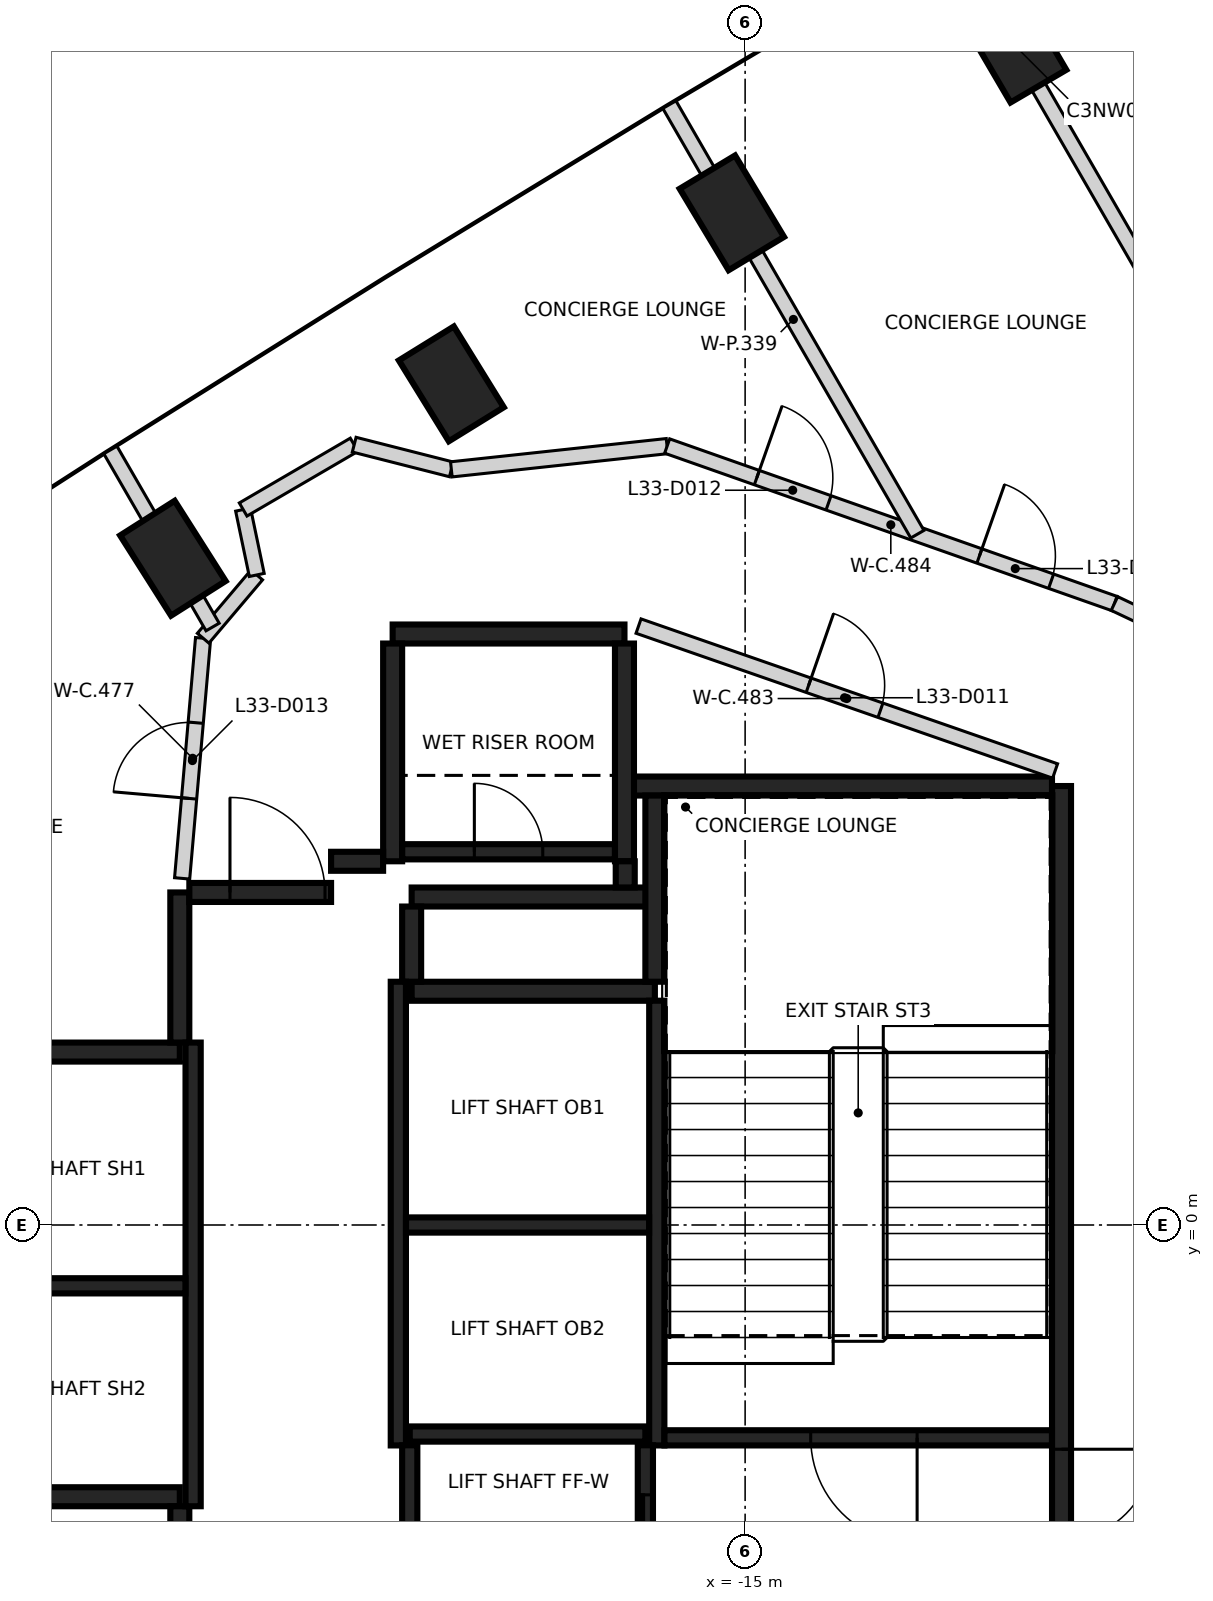
"""IFC4 building model, lengths in metres.
Left out: names, types, materials, properties, quantities, classifications, styles, units other than length and angle.
Written with IfcOpenShell. Run it as: python <this file> out.ifc"""

import sys

from ifc_helpers import new_model, si_unit, direction, frame, frame_2d, origin, origin_2d, place, context, subcontext, project, spatial, rectangle, extrude, element, fill, save


model = new_model("IFC4")
c1 = context("Model", 3, precision=1e-05, world=origin(), true_north=direction((0.0, 1.0)))
c2 = subcontext(c1, "Body", "Model", "MODEL_VIEW")
j1 = project(units=[si_unit("LENGTHUNIT", "METRE"), si_unit("PLANEANGLEUNIT", "RADIAN")], contexts=[c1])
p1 = place(None, origin())
s1 = spatial("IfcSite", under=j1, at=p1, CompositionType="ELEMENT")
p2 = place(p1, origin())
s2 = spatial("IfcBuilding", under=s1, at=p2, CompositionType="ELEMENT")
p3 = place(p2, frame((0.0, 0.0, 136.0)))
s3 = spatial("IfcBuildingStorey", under=s2, at=p3, CompositionType="ELEMENT", Elevation=136.0)
for number, where, z_axis, x_axis in (
    (1, (-11.457, 15.522, -0.4), (0.0, 0.0, 1.0), (-0.505, 0.863, 0.0)),
    (2, (-15.175, 13.316, -0.4), (0.0, 0.0, 1.0), (-0.515, 0.857, 0.0)),
    (3, (-18.865, 11.066, -0.4), (0.0, 0.0, 1.0), (-0.526, 0.851, 0.0)),
    (4, (-22.529, 8.772, -0.4), (0.0, 0.0, 1.0), (-0.536, 0.844, 0.0)),
):
    element("IfcColumn", number, at=place(p3, frame(where, z_axis=z_axis, x_axis=x_axis)), inside=s3, PredefinedType="COLUMN", context=c2, shape_type="SweptSolid", body=[
        extrude(rectangle(XDim=1.25, YDim=0.85, at=origin_2d()), origin(), (0.0, 0.0, 1.0), 3.6),
    ])
p4 = place(p3, frame((-10.837, 5.775, 0.0), z_axis=(0.0, 0.0, 1.0), x_axis=(0.0, -1.0, 0.0)))
e5 = element("IfcWall", 5, at=p4, inside=s3, PredefinedType="SHEAR", context=c2, shape_type="SweptSolid", body=[
    extrude(rectangle(XDim=11.55, YDim=0.25, at=frame_2d((5.775, 0.0))), origin(), (0.0, 0.0, 1.0), 3.2),
])
p5 = place(p4, frame((10.025, 0.0, 0.0)))
e6 = element("IfcOpeningElement", 6, at=p5, cuts=e5, PredefinedType="OPENING", context=c2, shape_type="SweptSolid", body=[
    extrude(rectangle(XDim=1.2, YDim=2.1, at=frame_2d((0.6, 1.05))), frame((0.0, 0.135, 0.0), z_axis=(0.0, -1.0, 0.0), x_axis=(1.0, 0.0, 0.0)), (0.0, 0.0, 1.0), 0.27),
])
p6 = place(p4, frame((8.725, 0.0, 0.0)))
e7 = element("IfcOpeningElement", 7, at=p6, cuts=e5, PredefinedType="OPENING", context=c2, shape_type="SweptSolid", body=[
    extrude(rectangle(XDim=1.2, YDim=2.1, at=frame_2d((0.6, 1.05))), frame((0.0, 0.135, 0.0), z_axis=(0.0, -1.0, 0.0), x_axis=(1.0, 0.0, 0.0)), (0.0, 0.0, 1.0), 0.27),
])
p7 = place(p3, frame((-16.472, 5.775, 0.0), z_axis=(0.0, 0.0, 1.0), x_axis=(1.0, 0.0, 0.0)))
e8 = element("IfcWall", 8, at=p7, inside=s3, PredefinedType="SHEAR", context=c2, shape_type="SweptSolid", body=[
    extrude(rectangle(XDim=5.51, YDim=0.25, at=frame_2d((2.755, 0.0))), origin(), (0.0, 0.0, 1.0), 3.2),
])
p8 = place(p3, frame((-19.387, 3.075, 0.0), z_axis=(0.0, 0.0, 1.0), x_axis=(1.0, 0.0, 0.0)))
e9 = element("IfcWall", 9, at=p8, inside=s3, PredefinedType="SHEAR", context=c2, shape_type="SweptSolid", body=[
    extrude(rectangle(XDim=3.2, YDim=0.25, at=frame_2d((1.6, 0.0))), origin(), (0.0, 0.0, 1.0), 3.2),
])
for number, where, z_axis, x_axis in (
    (10, (-22.437, -3.575, 0.0), (0.0, 0.0, 1.0), (-1.0, 0.0, 0.0)),
    (11, (-25.412, 2.275, 0.0), (0.0, 0.0, 1.0), (1.0, 0.0, 0.0)),
):
    element("IfcWall", number, at=place(p3, frame(where, z_axis=z_axis, x_axis=x_axis)), inside=s3, PredefinedType="SHEAR", context=c2, shape_type="SweptSolid", body=[
        extrude(rectangle(XDim=2.975, YDim=0.25, at=frame_2d((1.487, 0.0))), origin(), (0.0, 0.0, 1.0), 3.2),
    ])
p9 = place(p3, frame((-19.637, 7.775, 0.0), z_axis=(0.0, 0.0, 1.0), x_axis=(1.0, 0.0, 0.0)))
e12 = element("IfcWall", 12, at=p9, inside=s3, PredefinedType="SHEAR", context=c2, shape_type="SweptSolid", body=[
    extrude(rectangle(XDim=3.05, YDim=0.25, at=frame_2d((1.525, 0.0))), origin(), (0.0, 0.0, 1.0), 3.2),
])
for number, where, z_axis, x_axis in (
    (13, (-16.587, 7.65, 0.0), (0.0, 0.0, 1.0), (0.0, -1.0, 0.0)),
    (14, (-19.637, 4.785, 0.0), (0.0, 0.0, 1.0), (0.0, 1.0, 0.0)),
):
    element("IfcWall", number, at=place(p3, frame(where, z_axis=z_axis, x_axis=x_axis)), inside=s3, PredefinedType="SHEAR", context=c2, shape_type="SweptSolid", body=[
        extrude(rectangle(XDim=2.865, YDim=0.25, at=frame_2d((1.432, 0.0))), origin(), (0.0, 0.0, 1.0), 3.2),
    ])
p10 = place(p3, frame((-16.302, 4.315, 0.0), z_axis=(0.0, 0.0, 1.0), x_axis=(-1.0, 0.0, 0.0)))
e15 = element("IfcWall", 15, at=p10, inside=s3, PredefinedType="SHEAR", context=c2, shape_type="SweptSolid", body=[
    extrude(rectangle(XDim=3.085, YDim=0.25, at=frame_2d((1.542, 0.0))), origin(), (0.0, 0.0, 1.0), 3.2),
])
p11 = place(p3, frame((-16.187, 3.2, 0.0), z_axis=(0.0, 0.0, 1.0), x_axis=(0.0, 1.0, 0.0)))
e16 = element("IfcWall", 16, at=p11, inside=s3, PredefinedType="SHEAR", context=c2, shape_type="SweptSolid", body=[
    extrude(rectangle(XDim=2.449, YDim=0.25, at=frame_2d((1.225, 0.0))), origin(), (0.0, 0.0, 1.0), 3.2),
])
p12 = place(p3, frame((-22.437, 2.4, 0.0), z_axis=(0.0, 0.0, 1.0), x_axis=(0.0, 1.0, 0.0)))
e17 = element("IfcWall", 17, at=p12, inside=s3, PredefinedType="SHEAR", context=c2, shape_type="SweptSolid", body=[
    extrude(rectangle(XDim=1.975, YDim=0.25, at=frame_2d((0.987, 0.0))), origin(), (0.0, 0.0, 1.0), 3.2),
])
p13 = place(p3, frame((-22.437, -5.55, 0.0), z_axis=(0.0, 0.0, 1.0), x_axis=(0.0, 1.0, 0.0)))
e18 = element("IfcWall", 18, at=p13, inside=s3, PredefinedType="SHEAR", context=c2, shape_type="SweptSolid", body=[
    extrude(rectangle(XDim=1.849, YDim=0.25, at=frame_2d((0.925, 0.0))), origin(), (0.0, 0.0, 1.0), 3.2),
])
p14 = place(p3, frame((-22.312, 4.375, 0.0), z_axis=(0.0, 0.0, 1.0), x_axis=(1.0, 0.0, 0.0)))
e19 = element("IfcWall", 19, at=p14, inside=s3, PredefinedType="SHEAR", context=c2, shape_type="SweptSolid", body=[
    extrude(rectangle(XDim=1.865, YDim=0.25, at=frame_2d((0.932, 0.0))), origin(), (0.0, 0.0, 1.0), 3.2),
])
p15 = place(p14, frame((0.535, 0.0, 0.0)))
e20 = element("IfcOpeningElement", 20, at=p15, cuts=e19, PredefinedType="OPENING", context=c2, shape_type="SweptSolid", body=[
    extrude(rectangle(XDim=1.25, YDim=2.1, at=frame_2d((0.625, 1.05))), frame((0.0, 0.135, 0.0), z_axis=(0.0, -1.0, 0.0), x_axis=(1.0, 0.0, 0.0)), (0.0, 0.0, 1.0), 0.27),
])
p16 = place(p3, frame((-19.387, 4.19, 0.0), z_axis=(0.0, 0.0, 1.0), x_axis=(0.0, -1.0, 0.0)))
e21 = element("IfcWall", 21, at=p16, inside=s3, PredefinedType="SHEAR", context=c2, shape_type="SweptSolid", body=[
    extrude(rectangle(XDim=0.989, YDim=0.25, at=frame_2d((0.495, 0.0))), origin(), (0.0, 0.0, 1.0), 3.2),
])
p17 = place(p3, frame((-20.447, 4.785, 0.0), z_axis=(0.0, 0.0, 1.0), x_axis=(1.0, 0.0, 0.0)))
e22 = element("IfcWall", 22, at=p17, inside=s3, PredefinedType="SHEAR", context=c2, shape_type="SweptSolid", body=[
    extrude(rectangle(XDim=0.685, YDim=0.25, at=frame_2d((0.342, 0.0))), origin(), (0.0, 0.0, 1.0), 3.2),
])
p18 = place(p3, frame((-16.577, 4.785, 0.0), z_axis=(0.0, 0.0, 1.0), x_axis=(0.0, -1.0, 0.0)))
e23 = element("IfcWall", 23, at=p18, inside=s3, PredefinedType="SHEAR", context=c2, shape_type="SweptSolid", body=[
    extrude(rectangle(XDim=0.344, YDim=0.25, at=frame_2d((0.172, 0.0))), origin(), (0.0, 0.0, 1.0), 3.2),
])
p19 = place(p3, frame((-16.162, 2.951, 0.0), z_axis=(0.0, 0.0, 1.0), x_axis=(0.0, -1.0, 0.0)))
e24 = element("IfcWall", 24, at=p19, inside=s3, PredefinedType="SHEAR", context=c2, shape_type="SweptSolid", body=[
    extrude(rectangle(XDim=5.851, YDim=0.2, at=frame_2d((2.925, 0.0))), origin(), (0.0, 0.0, 1.0), 3.2),
])
for number, where, z_axis, x_axis in (
    (25, (-19.562, -2.9, 0.0), (0.0, 0.0, 1.0), (0.0, 1.0, 0.0)),
    (26, (-22.262, 2.4, 0.0), (0.0, 0.0, 1.0), (0.0, -1.0, 0.0)),
):
    element("IfcWall", number, at=place(p3, frame(where, z_axis=z_axis, x_axis=x_axis)), inside=s3, PredefinedType="SHEAR", context=c2, shape_type="SweptSolid", body=[
        extrude(rectangle(XDim=6.1, YDim=0.2, at=frame_2d((3.05, 0.0))), origin(), (0.0, 0.0, 1.0), 3.2),
    ])
p20 = place(p3, frame((-10.963, -2.8, 0.0), z_axis=(0.0, 0.0, 1.0), x_axis=(-1.0, 0.0, 0.0)))
e27 = element("IfcWall", 27, at=p20, inside=s3, PredefinedType="SHEAR", context=c2, shape_type="SweptSolid", body=[
    extrude(rectangle(XDim=5.098, YDim=0.2, at=frame_2d((2.549, 0.0))), origin(), (0.0, 0.0, 1.0), 3.2),
])
p21 = place(p20, frame((1.774, 0.0, 0.0)))
e28 = element("IfcOpeningElement", 28, at=p21, cuts=e27, PredefinedType="OPENING", context=c2, shape_type="SweptSolid", body=[
    extrude(rectangle(XDim=1.4, YDim=2.1, at=frame_2d((0.7, 1.05))), frame((0.0, 0.11, 0.0), z_axis=(0.0, -1.0, 0.0), x_axis=(1.0, 0.0, 0.0)), (0.0, 0.0, 1.0), 0.22),
])
p22 = place(p3, frame((-16.263, 0.0, 0.0), z_axis=(0.0, 0.0, 1.0), x_axis=(-1.0, 0.0, 0.0)))
e29 = element("IfcWall", 29, at=p22, inside=s3, PredefinedType="SHEAR", context=c2, shape_type="SweptSolid", body=[
    extrude(rectangle(XDim=3.198, YDim=0.2, at=frame_2d((1.599, 0.0))), origin(), (0.0, 0.0, 1.0), 3.2),
])
p23 = place(p3, frame((-22.363, -0.8, 0.0), z_axis=(0.0, 0.0, 1.0), x_axis=(-1.0, 0.0, 0.0)))
e30 = element("IfcWall", 30, at=p23, inside=s3, PredefinedType="SHEAR", context=c2, shape_type="SweptSolid", body=[
    extrude(rectangle(XDim=3.048, YDim=0.2, at=frame_2d((1.524, 0.0))), origin(), (0.0, 0.0, 1.0), 3.2),
])
p24 = place(p3, frame((-19.511, 4.91, 0.0), z_axis=(0.0, 0.0, 1.0), x_axis=(1.0, 0.0, 0.0)))
e31 = element("IfcWall", 31, at=p24, inside=s3, PredefinedType="SHEAR", context=c2, shape_type="SweptSolid", body=[
    extrude(rectangle(XDim=2.798, YDim=0.2, at=frame_2d((1.399, 0.0))), origin(), (0.0, 0.0, 1.0), 3.2),
])
p25 = place(p24, frame((0.949, 0.0, 0.0)))
e32 = element("IfcOpeningElement", 32, at=p25, cuts=e31, PredefinedType="OPENING", context=c2, shape_type="SweptSolid", body=[
    extrude(rectangle(XDim=0.9, YDim=2.1, at=frame_2d((0.45, 1.05))), frame((0.0, 0.11, 0.0), z_axis=(0.0, -1.0, 0.0), x_axis=(1.0, 0.0, 0.0)), (0.0, 0.0, 1.0), 0.22),
])
p26 = place(p3, frame((-19.412, -2.75, 0.0), z_axis=(0.0, 0.0, 1.0), x_axis=(1.0, 0.0, 0.0)))
e33 = element("IfcWall", 33, at=p26, inside=s3, PredefinedType="SHEAR", context=c2, shape_type="SweptSolid", body=[
    extrude(rectangle(XDim=3.1, YDim=0.2, at=frame_2d((1.55, 0.0))), origin(), (0.0, 0.0, 1.0), 3.2),
])
p27 = place(p3, frame((-16.312, -2.898, 0.0), z_axis=(0.0, 0.0, 1.0), x_axis=(0.0, -1.0, 0.0)))
e34 = element("IfcWall", 34, at=p27, inside=s3, PredefinedType="SHEAR", context=c2, shape_type="SweptSolid", body=[
    extrude(rectangle(XDim=2.651, YDim=0.2, at=frame_2d((1.325, 0.0))), origin(), (0.0, 0.0, 1.0), 3.2),
])
p28 = place(p27, frame((0.652, 0.0, 0.0)))
e35 = element("IfcOpeningElement", 35, at=p28, cuts=e34, PredefinedType="OPENING", context=c2, shape_type="SweptSolid", body=[
    extrude(rectangle(XDim=1.3, YDim=2.1, at=frame_2d((0.65, 1.05))), frame((0.0, 0.11, 0.0), z_axis=(0.0, -1.0, 0.0), x_axis=(1.0, 0.0, 0.0)), (0.0, 0.0, 1.0), 0.22),
])
p29 = place(p3, frame((-19.412, -5.549, 0.0), z_axis=(0.0, 0.0, 1.0), x_axis=(0.0, 1.0, 0.0)))
e36 = element("IfcWall", 36, at=p29, inside=s3, PredefinedType="SHEAR", context=c2, shape_type="SweptSolid", body=[
    extrude(rectangle(XDim=2.651, YDim=0.2, at=frame_2d((1.325, 0.0))), origin(), (0.0, 0.0, 1.0), 3.2),
])
p30 = place(p3, frame((-22.407, 4.56, 0.0), z_axis=(0.0, 0.0, 1.0), x_axis=(0.086898645684, 0.996217157741, 0.0)))
e37 = element("IfcWall", 37, at=p30, inside=s3, PredefinedType="PARTITIONING", context=c2, shape_type="SweptSolid", body=[
    extrude(rectangle(XDim=3.172, YDim=0.2, at=frame_2d((1.586, 0.0))), origin(), (0.0, 0.0, 1.0), 3.2),
])
p31 = place(p30, frame((1.056, 0.0, 0.0)))
e38 = element("IfcOpeningElement", 38, at=p31, cuts=e37, PredefinedType="OPENING", context=c2, shape_type="SweptSolid", body=[
    extrude(rectangle(XDim=1.0, YDim=2.1, at=frame_2d((0.5, 1.05))), frame((0.0, 0.11, 0.0), z_axis=(0.0, -1.0, 0.0), x_axis=(1.0, 0.0, 0.0)), (0.0, 0.0, 1.0), 0.22),
])
p32 = place(p3, frame((-22.13, 7.719, 0.0), z_axis=(0.0, 0.0, 1.0), x_axis=(0.646413536249, 0.762987247701, 0.0)))
e39 = element("IfcWall", 39, at=p32, inside=s3, PredefinedType="PARTITIONING", context=c2, shape_type="SweptSolid", body=[
    extrude(rectangle(XDim=1.091, YDim=0.2, at=frame_2d((0.545, 0.0))), origin(), (0.0, 0.0, 1.0), 3.2),
])
p33 = place(p3, frame((-21.605, 9.412, 0.0), z_axis=(0.0, 0.0, 1.0), x_axis=(0.204764111512, -0.978811349871, 0.0)))
e40 = element("IfcWall", 40, at=p33, inside=s3, PredefinedType="PARTITIONING", context=c2, shape_type="SweptSolid", body=[
    extrude(rectangle(XDim=0.879, YDim=0.2, at=frame_2d((0.439, 0.0))), origin(), (0.0, 0.0, 1.0), 2.3),
])
p34 = place(p3, frame((-21.604, 9.413, 0.0), z_axis=(0.0, 0.0, 1.0), x_axis=(0.863736988548, 0.503942868402, 0.0)))
e41 = element("IfcWall", 41, at=p34, inside=s3, PredefinedType="PARTITIONING", context=c2, shape_type="SweptSolid", body=[
    extrude(rectangle(XDim=1.69, YDim=0.2, at=frame_2d((0.845, 0.0))), origin(), (0.0, 0.0, 1.0), 2.3),
])
p35 = place(p3, frame((-20.143, 10.266, 0.0), z_axis=(0.0, 0.0, 1.0), x_axis=(0.969121308325, -0.246584447505, 0.0)))
e42 = element("IfcWall", 42, at=p35, inside=s3, PredefinedType="PARTITIONING", context=c2, shape_type="SweptSolid", body=[
    extrude(rectangle(XDim=1.319, YDim=0.2, at=frame_2d((0.659, 0.0))), origin(), (0.0, 0.0, 1.0), 2.3),
])
p36 = place(p3, frame((-18.865, 9.941, 0.0), z_axis=(0.0, 0.0, 1.0), x_axis=(0.99423123086, 0.107257911519, 0.0)))
e43 = element("IfcWall", 43, at=p36, inside=s3, PredefinedType="PARTITIONING", context=c2, shape_type="SweptSolid", body=[
    extrude(rectangle(XDim=2.854, YDim=0.2, at=frame_2d((1.427, 0.0))), origin(), (0.0, 0.0, 1.0), 3.2),
])
p37 = place(p3, frame((-16.402, 7.879, 0.0), z_axis=(0.0, 0.0, 1.0), x_axis=(0.944492255471, -0.328533680702, 0.0)))
e44 = element("IfcWall", 44, at=p37, inside=s3, PredefinedType="PARTITIONING", context=c2, shape_type="SweptSolid", body=[
    extrude(rectangle(XDim=5.802, YDim=0.2, at=frame_2d((2.901, 0.0))), origin(), (0.0, 0.0, 1.0), 3.2),
])
p38 = place(p37, frame((2.37, 0.0, 0.0)))
e45 = element("IfcOpeningElement", 45, at=p38, cuts=e44, PredefinedType="OPENING", context=c2, shape_type="SweptSolid", body=[
    extrude(rectangle(XDim=1.0, YDim=2.1, at=frame_2d((0.5, 1.05))), frame((0.0, 0.11, 0.0), z_axis=(0.0, -1.0, 0.0), x_axis=(1.0, 0.0, 0.0)), (0.0, 0.0, 1.0), 0.22),
])
p39 = place(p3, frame((-16.026, 10.248, 0.0), z_axis=(0.0, 0.0, 1.0), x_axis=(0.943234993827, -0.332126100179, 0.0)))
e46 = element("IfcWall", 46, at=p39, inside=s3, PredefinedType="PARTITIONING", context=c2, shape_type="SweptSolid", body=[
    extrude(rectangle(XDim=6.239, YDim=0.2, at=frame_2d((3.119, 0.0))), origin(), (0.0, 0.0, 1.0), 3.2),
])
p40 = place(p39, frame((4.355, 0.0, 0.0)))
e47 = element("IfcOpeningElement", 47, at=p40, cuts=e46, PredefinedType="OPENING", context=c2, shape_type="SweptSolid", body=[
    extrude(rectangle(XDim=1.0, YDim=2.1, at=frame_2d((0.5, 1.05))), frame((0.0, 0.11, 0.0), z_axis=(0.0, -1.0, 0.0), x_axis=(1.0, 0.0, 0.0)), (0.0, 0.0, 1.0), 0.22),
])
p41 = place(p39, frame((1.251, 0.0, 0.0)))
e48 = element("IfcOpeningElement", 48, at=p41, cuts=e46, PredefinedType="OPENING", context=c2, shape_type="SweptSolid", body=[
    extrude(rectangle(XDim=1.0, YDim=2.1, at=frame_2d((0.5, 1.05))), frame((0.0, 0.11, 0.0), z_axis=(0.0, -1.0, 0.0), x_axis=(1.0, 0.0, 0.0)), (0.0, 0.0, 1.0), 0.22),
])
p42 = place(p3, frame((-10.141, 8.176, 0.0), z_axis=(0.0, 0.0, 1.0), x_axis=(0.903904169039, -0.427735026849, 0.0)))
e49 = element("IfcWall", 49, at=p42, inside=s3, PredefinedType="PARTITIONING", context=c2, shape_type="SweptSolid", body=[
    extrude(rectangle(XDim=1.225, YDim=0.2, at=frame_2d((0.612, 0.0))), origin(), (0.0, 0.0, 1.0), 3.2),
])
p43 = place(p3, frame((-23.351, 10.197, 0.0), z_axis=(0.0, 0.0, 1.0), x_axis=(0.49992673358, -0.86606770004, 0.0)))
e50 = element("IfcWall", 50, at=p43, inside=s3, PredefinedType="PARTITIONING", context=c2, shape_type="SweptSolid", body=[
    extrude(rectangle(XDim=2.69, YDim=0.2, at=frame_2d((1.345, 0.0))), origin(), (0.0, 0.0, 1.0), 3.2),
])
p44 = place(p3, frame((-15.996, 14.74, 0.0), z_axis=(0.0, 0.0, 1.0), x_axis=(0.499925398456, -0.866068470722, 0.0)))
e51 = element("IfcWall", 51, at=p44, inside=s3, PredefinedType="PARTITIONING", context=c2, shape_type="SweptSolid", body=[
    extrude(rectangle(XDim=6.526, YDim=0.2, at=frame_2d((3.263, 0.0))), origin(), (0.0, 0.0, 1.0), 3.2),
])
p45 = place(p3, frame((-12.279, 16.946, 0.0), z_axis=(0.0, 0.0, 1.0), x_axis=(0.499902454835, -0.866081714187, 0.0)))
e52 = element("IfcWall", 52, at=p45, inside=s3, PredefinedType="PARTITIONING", context=c2, shape_type="SweptSolid", body=[
    extrude(rectangle(XDim=12.015, YDim=0.2, at=frame_2d((6.008, 0.0))), origin(), (0.0, 0.0, 1.0), 3.2),
])
p46 = place(p28, origin())
e53 = element("IfcDoor", 53, at=p46, inside=s3, OperationType="SLIDING_TO_LEFT", PredefinedType="DOOR", context=c2, shape_type="SweptSolid", body=[
    extrude(rectangle(XDim=1.3, YDim=2.1, at=frame_2d((0.65, 1.05))), frame((0.0, 0.025, 0.0), z_axis=(0.0, -1.0, 0.0), x_axis=(1.0, 0.0, 0.0)), (0.0, 0.0, 1.0), 0.05),
])
fill(e35, e53)
p47 = place(p15, origin())
e54 = element("IfcDoor", 54, at=p47, inside=s3, OperationType="SINGLE_SWING_LEFT", PredefinedType="DOOR", context=c2, shape_type="SweptSolid", body=[
    extrude(rectangle(XDim=1.25, YDim=2.1, at=frame_2d((0.625, 1.05))), frame((0.0, 0.025, 0.0), z_axis=(0.0, -1.0, 0.0), x_axis=(1.0, 0.0, 0.0)), (0.0, 0.0, 1.0), 0.05),
])
fill(e20, e54)
p48 = place(p6, origin())
e55 = element("IfcDoor", 55, at=p48, inside=s3, OperationType="SINGLE_SWING_RIGHT", PredefinedType="DOOR", context=c2, shape_type="SweptSolid", body=[
    extrude(rectangle(XDim=1.2, YDim=2.1, at=frame_2d((0.6, 1.05))), frame((0.0, 0.025, 0.0), z_axis=(0.0, -1.0, 0.0), x_axis=(1.0, 0.0, 0.0)), (0.0, 0.0, 1.0), 0.05),
])
fill(e7, e55)
p49 = place(p21, origin())
e56 = element("IfcDoor", 56, at=p49, inside=s3, OperationType="SINGLE_SWING_LEFT", PredefinedType="DOOR", context=c2, shape_type="SweptSolid", body=[
    extrude(rectangle(XDim=1.4, YDim=2.1, at=frame_2d((0.7, 1.05))), frame((0.0, 0.025, 0.0), z_axis=(0.0, -1.0, 0.0), x_axis=(1.0, 0.0, 0.0)), (0.0, 0.0, 1.0), 0.05),
])
fill(e28, e56)
p50 = place(p25, origin())
e57 = element("IfcDoor", 57, at=p50, inside=s3, OperationType="SINGLE_SWING_RIGHT", PredefinedType="DOOR", context=c2, shape_type="SweptSolid", body=[
    extrude(rectangle(XDim=0.9, YDim=2.1, at=frame_2d((0.45, 1.05))), frame((0.0, 0.025, 0.0), z_axis=(0.0, -1.0, 0.0), x_axis=(1.0, 0.0, 0.0)), (0.0, 0.0, 1.0), 0.05),
])
fill(e32, e57)
p51 = place(p40, origin())
e58 = element("IfcDoor", 58, at=p51, inside=s3, OperationType="SINGLE_SWING_LEFT", PredefinedType="DOOR", context=c2, shape_type="SweptSolid", body=[
    extrude(rectangle(XDim=1.0, YDim=2.1, at=frame_2d((0.5, 1.05))), frame((0.0, 0.025, 0.0), z_axis=(0.0, -1.0, 0.0), x_axis=(1.0, 0.0, 0.0)), (0.0, 0.0, 1.0), 0.05),
])
fill(e47, e58)
p52 = place(p38, frame((1.0, 0.0, 0.0), z_axis=(0.0, 0.0, 1.0), x_axis=(-1.0, 0.0, 0.0)))
e59 = element("IfcDoor", 59, at=p52, inside=s3, OperationType="SINGLE_SWING_LEFT", PredefinedType="DOOR", context=c2, shape_type="SweptSolid", body=[
    extrude(rectangle(XDim=1.0, YDim=2.1, at=frame_2d((0.5, 1.05))), frame((0.0, 0.025, 0.0), z_axis=(0.0, -1.0, 0.0), x_axis=(1.0, 0.0, 0.0)), (0.0, 0.0, 1.0), 0.05),
])
fill(e45, e59)
p53 = place(p41, origin())
e60 = element("IfcDoor", 60, at=p53, inside=s3, OperationType="SINGLE_SWING_LEFT", PredefinedType="DOOR", context=c2, shape_type="SweptSolid", body=[
    extrude(rectangle(XDim=1.0, YDim=2.1, at=frame_2d((0.5, 1.05))), frame((0.0, 0.025, 0.0), z_axis=(0.0, -1.0, 0.0), x_axis=(1.0, 0.0, 0.0)), (0.0, 0.0, 1.0), 0.05),
])
fill(e48, e60)
p54 = place(p31, origin())
e61 = element("IfcDoor", 61, at=p54, inside=s3, OperationType="SINGLE_SWING_LEFT", PredefinedType="DOOR", context=c2, shape_type="SweptSolid", body=[
    extrude(rectangle(XDim=1.0, YDim=2.1, at=frame_2d((0.5, 1.05))), frame((0.0, 0.025, 0.0), z_axis=(0.0, -1.0, 0.0), x_axis=(1.0, 0.0, 0.0)), (0.0, 0.0, 1.0), 0.05),
])
fill(e38, e61)
save(model, sys.argv[1])
